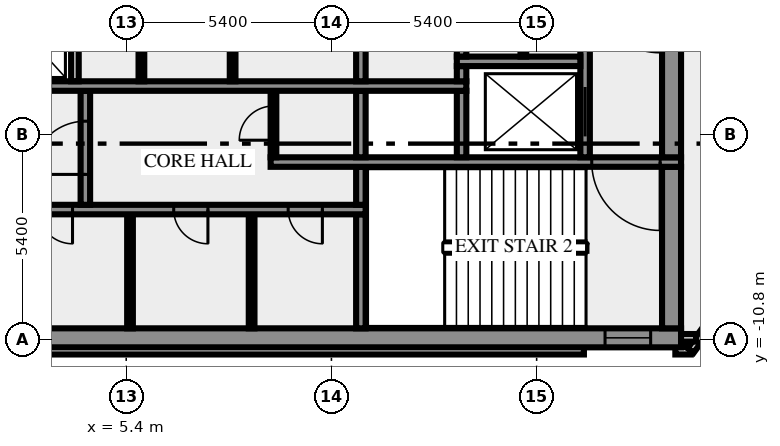
"""IFC4 building model, lengths in metres.
Left out: names, types, materials, properties, quantities, classifications, styles, units other than length and angle.
Written with IfcOpenShell. Run it as: python <this file> out.ifc"""

import sys

from ifc_helpers import new_model, si_unit, direction, frame, frame_2d, origin, place, context, subcontext, project, spatial, rectangle, extrude, element, fill, save


model = new_model("IFC4")
c1 = context("Model", 3, precision=1e-05, world=origin(), true_north=direction((0.0, 1.0)))
c2 = subcontext(c1, "Body", "Model", "MODEL_VIEW")
j1 = project(units=[si_unit("LENGTHUNIT", "METRE"), si_unit("PLANEANGLEUNIT", "RADIAN")], contexts=[c1])
p1 = place(None, origin())
s1 = spatial("IfcSite", under=j1, at=p1, CompositionType="ELEMENT")
p2 = place(p1, origin())
s2 = spatial("IfcBuilding", under=s1, at=p2, CompositionType="ELEMENT")
p3 = place(p2, frame((0.0, 0.0, 327.0)))
s3 = spatial("IfcBuildingStorey", under=s2, at=p3, CompositionType="ELEMENT", Elevation=327.0)
p4 = place(p3, frame((-17.444, -11.088, 0.0), z_axis=(0.0, 0.0, 1.0), x_axis=(1.0, 0.0, 0.0)))
e1 = element("IfcWall", 1, at=p4, inside=s3, PredefinedType="SOLIDWALL", context=c2, shape_type="SweptSolid", body=[
    extrude(rectangle(XDim=34.888, YDim=0.2, at=frame_2d((17.444, 0.0))), origin(), (0.0, 0.0, 1.0), 3.65),
])
p5 = place(p3, frame((19.85, -11.088, 0.0), z_axis=(0.0, 0.0, 1.0), x_axis=(1.0, 0.0, 0.0)))
e2 = element("IfcWall", 2, at=p5, inside=s3, PredefinedType="SOLIDWALL", context=c2, shape_type="SweptSolid", body=[
    extrude(rectangle(XDim=0.406, YDim=0.2, at=frame_2d((0.203, 0.0))), origin(), (0.0, 0.0, 1.0), 3.65),
])
p6 = place(p3, frame((20.253, -11.083, 0.0), z_axis=(0.0, 0.0, 1.0), x_axis=(0.587766567315, 0.809030569476, 0.0)))
e3 = element("IfcWall", 3, at=p6, inside=s3, PredefinedType="SOLIDWALL", context=c2, shape_type="SweptSolid", body=[
    extrude(rectangle(XDim=2.688, YDim=0.2, at=frame_2d((1.344, 0.0))), origin(), (0.0, 0.0, 1.0), 3.65),
])
p7 = place(p3, frame((19.98, -10.75, 0.0), z_axis=(0.0, 0.0, 1.0), x_axis=(1.0, 0.0, 0.0)))
e4 = element("IfcWall", 4, at=p7, inside=s3, PredefinedType="SOLIDWALL", context=c2, shape_type="SweptSolid", body=[
    extrude(rectangle(XDim=0.417, YDim=0.2, at=frame_2d((0.208, 0.0))), origin(), (0.0, 0.0, 1.0), 3.65),
])
p8 = place(p3, frame((-20.0, -10.75, 0.0), z_axis=(0.0, 0.0, 1.0), x_axis=(1.0, 0.0, 0.0)))
e5 = element("IfcWall", 5, at=p8, inside=s3, PredefinedType="SHEAR", context=c2, shape_type="SweptSolid", body=[
    extrude(rectangle(XDim=40.0, YDim=0.5, at=frame_2d((20.0, 0.0))), origin(), (0.0, 0.0, 1.0), 3.65),
])
p9 = place(p8, frame((0.8, 0.0, 1.0)))
e6 = element("IfcOpeningElement", 6, at=p9, cuts=e5, PredefinedType="OPENING", context=c2, shape_type="SweptSolid", body=[
    extrude(rectangle(XDim=1.2, YDim=1.2, at=frame_2d((0.6, 0.6))), frame((0.0, 0.26, 0.0), z_axis=(0.0, -1.0, 0.0), x_axis=(1.0, 0.0, 0.0)), (0.0, 0.0, 1.0), 0.52),
])
p10 = place(p8, frame((38.0, 0.0, 1.0)))
e7 = element("IfcOpeningElement", 7, at=p10, cuts=e5, PredefinedType="OPENING", context=c2, shape_type="SweptSolid", body=[
    extrude(rectangle(XDim=1.2, YDim=1.2, at=frame_2d((0.6, 0.6))), frame((0.0, 0.26, 0.0), z_axis=(0.0, -1.0, 0.0), x_axis=(1.0, 0.0, 0.0)), (0.0, 0.0, 1.0), 0.52),
])
for number, where, z_axis, x_axis in (
    (8, (5.5, -10.5, 0.0), (0.0, 0.0, 1.0), (0.0, 1.0, 0.0)),
    (9, (8.7, -10.5, 0.0), (0.0, 0.0, 1.0), (0.0, 1.0, 0.0)),
):
    element("IfcWall", number, at=place(p3, frame(where, z_axis=z_axis, x_axis=x_axis)), inside=s3, PredefinedType="PARTITIONING", context=c2, shape_type="SweptSolid", body=[
        extrude(rectangle(XDim=3.0, YDim=0.15, at=frame_2d((1.5, 0.0))), origin(), (0.0, 0.0, 1.0), 3.65),
    ])
p11 = place(p3, frame((11.575, -10.5, 0.0), z_axis=(0.0, 0.0, 1.0), x_axis=(0.0, 1.0, 0.0)))
e10 = element("IfcWall", 10, at=p11, inside=s3, PredefinedType="SHEAR", context=c2, shape_type="SweptSolid", body=[
    extrude(rectangle(XDim=3.0, YDim=0.25, at=frame_2d((1.5, 0.0))), origin(), (0.0, 0.0, 1.0), 3.65),
])
p12 = place(p3, frame((19.75, -10.5, 0.0), z_axis=(0.0, 0.0, 1.0), x_axis=(0.0, 1.0, 0.0)))
e11 = element("IfcWall", 11, at=p12, inside=s3, PredefinedType="SHEAR", context=c2, shape_type="SweptSolid", body=[
    extrude(rectangle(XDim=4.25, YDim=0.5, at=frame_2d((2.125, 0.0))), origin(), (0.0, 0.0, 1.0), 3.65),
])
p13 = place(p3, frame((11.7, -7.375, 0.0), z_axis=(0.0, 0.0, 1.0), x_axis=(-1.0, 0.0, 0.0)))
e12 = element("IfcWall", 12, at=p13, inside=s3, PredefinedType="SHEAR", context=c2, shape_type="SweptSolid", body=[
    extrude(rectangle(XDim=23.4, YDim=0.25, at=frame_2d((11.7, 0.0))), origin(), (0.0, 0.0, 1.0), 3.65),
])
p14 = place(p13, frame((22.225, 0.0, 0.0)))
e13 = element("IfcOpeningElement", 13, at=p14, cuts=e12, PredefinedType="OPENING", context=c2, shape_type="SweptSolid", body=[
    extrude(rectangle(XDim=0.8, YDim=2.1, at=frame_2d((0.4, 1.05))), frame((0.0, 0.135, 0.0), z_axis=(0.0, -1.0, 0.0), x_axis=(1.0, 0.0, 0.0)), (0.0, 0.0, 1.0), 0.27),
])
p15 = place(p13, frame((20.2, 0.0, 0.0)))
e14 = element("IfcOpeningElement", 14, at=p15, cuts=e12, PredefinedType="OPENING", context=c2, shape_type="SweptSolid", body=[
    extrude(rectangle(XDim=1.1, YDim=2.1, at=frame_2d((0.55, 1.05))), frame((0.0, 0.135, 0.0), z_axis=(0.0, -1.0, 0.0), x_axis=(1.0, 0.0, 0.0)), (0.0, 0.0, 1.0), 0.27),
])
p16 = place(p13, frame((17.7, 0.0, 0.0)))
e15 = element("IfcOpeningElement", 15, at=p16, cuts=e12, PredefinedType="OPENING", context=c2, shape_type="SweptSolid", body=[
    extrude(rectangle(XDim=1.1, YDim=2.1, at=frame_2d((0.55, 1.05))), frame((0.0, 0.135, 0.0), z_axis=(0.0, -1.0, 0.0), x_axis=(1.0, 0.0, 0.0)), (0.0, 0.0, 1.0), 0.27),
])
p17 = place(p13, frame((15.975, 0.0, 0.0)))
e16 = element("IfcOpeningElement", 16, at=p17, cuts=e12, PredefinedType="OPENING", context=c2, shape_type="SweptSolid", body=[
    extrude(rectangle(XDim=0.8, YDim=2.1, at=frame_2d((0.4, 1.05))), frame((0.0, 0.135, 0.0), z_axis=(0.0, -1.0, 0.0), x_axis=(1.0, 0.0, 0.0)), (0.0, 0.0, 1.0), 0.27),
])
p18 = place(p13, frame((14.5, 0.0, 0.0)))
e17 = element("IfcOpeningElement", 17, at=p18, cuts=e12, PredefinedType="OPENING", context=c2, shape_type="SweptSolid", body=[
    extrude(rectangle(XDim=0.9, YDim=2.1, at=frame_2d((0.45, 1.05))), frame((0.0, 0.135, 0.0), z_axis=(0.0, -1.0, 0.0), x_axis=(1.0, 0.0, 0.0)), (0.0, 0.0, 1.0), 0.27),
])
p19 = place(p13, frame((12.95, 0.0, 0.0)))
e18 = element("IfcOpeningElement", 18, at=p19, cuts=e12, PredefinedType="OPENING", context=c2, shape_type="SweptSolid", body=[
    extrude(rectangle(XDim=0.9, YDim=2.1, at=frame_2d((0.45, 1.05))), frame((0.0, 0.135, 0.0), z_axis=(0.0, -1.0, 0.0), x_axis=(1.0, 0.0, 0.0)), (0.0, 0.0, 1.0), 0.27),
])
p20 = place(p13, frame((11.475, 0.0, 0.0)))
e19 = element("IfcOpeningElement", 19, at=p20, cuts=e12, PredefinedType="OPENING", context=c2, shape_type="SweptSolid", body=[
    extrude(rectangle(XDim=0.9, YDim=2.1, at=frame_2d((0.45, 1.05))), frame((0.0, 0.135, 0.0), z_axis=(0.0, -1.0, 0.0), x_axis=(1.0, 0.0, 0.0)), (0.0, 0.0, 1.0), 0.27),
])
p21 = place(p13, frame((10.45, 0.0, 0.0)))
e20 = element("IfcOpeningElement", 20, at=p21, cuts=e12, PredefinedType="OPENING", context=c2, shape_type="SweptSolid", body=[
    extrude(rectangle(XDim=0.5, YDim=2.1, at=frame_2d((0.25, 1.05))), frame((0.0, 0.135, 0.0), z_axis=(0.0, -1.0, 0.0), x_axis=(1.0, 0.0, 0.0)), (0.0, 0.0, 1.0), 0.27),
])
p22 = place(p13, frame((7.713, 0.0, 0.0)))
e21 = element("IfcOpeningElement", 21, at=p22, cuts=e12, PredefinedType="OPENING", context=c2, shape_type="SweptSolid", body=[
    extrude(rectangle(XDim=0.9, YDim=2.1, at=frame_2d((0.45, 1.05))), frame((0.0, 0.135, 0.0), z_axis=(0.0, -1.0, 0.0), x_axis=(1.0, 0.0, 0.0)), (0.0, 0.0, 1.0), 0.27),
])
p23 = place(p13, frame((4.15, 0.0, 0.0)))
e22 = element("IfcOpeningElement", 22, at=p23, cuts=e12, PredefinedType="OPENING", context=c2, shape_type="SweptSolid", body=[
    extrude(rectangle(XDim=0.9, YDim=2.1, at=frame_2d((0.45, 1.05))), frame((0.0, 0.135, 0.0), z_axis=(0.0, -1.0, 0.0), x_axis=(1.0, 0.0, 0.0)), (0.0, 0.0, 1.0), 0.27),
])
p24 = place(p13, frame((1.138, 0.0, 0.0)))
e23 = element("IfcOpeningElement", 23, at=p24, cuts=e12, PredefinedType="OPENING", context=c2, shape_type="SweptSolid", body=[
    extrude(rectangle(XDim=0.9, YDim=2.1, at=frame_2d((0.45, 1.05))), frame((0.0, 0.135, 0.0), z_axis=(0.0, -1.0, 0.0), x_axis=(1.0, 0.0, 0.0)), (0.0, 0.0, 1.0), 0.27),
])
p25 = place(p3, frame((4.325, -7.25, 0.0), z_axis=(0.0, 0.0, 1.0), x_axis=(0.0, 1.0, 0.0)))
e24 = element("IfcWall", 24, at=p25, inside=s3, PredefinedType="SHEAR", context=c2, shape_type="SweptSolid", body=[
    extrude(rectangle(XDim=3.0, YDim=0.25, at=frame_2d((1.5, 0.0))), origin(), (0.0, 0.0, 1.0), 3.65),
])
p26 = place(p25, frame((0.8, 0.0, 0.0)))
e25 = element("IfcOpeningElement", 25, at=p26, cuts=e24, PredefinedType="OPENING", context=c2, shape_type="SweptSolid", body=[
    extrude(rectangle(XDim=1.4, YDim=2.1, at=frame_2d((0.7, 1.05))), frame((0.0, 0.135, 0.0), z_axis=(0.0, -1.0, 0.0), x_axis=(1.0, 0.0, 0.0)), (0.0, 0.0, 1.0), 0.27),
])
p27 = place(p3, frame((11.575, -7.25, 0.0), z_axis=(0.0, 0.0, 1.0), x_axis=(0.0, 1.0, 0.0)))
e26 = element("IfcWall", 26, at=p27, inside=s3, PredefinedType="SHEAR", context=c2, shape_type="SweptSolid", body=[
    extrude(rectangle(XDim=1.0, YDim=0.25, at=frame_2d((0.5, 0.0))), origin(), (0.0, 0.0, 1.0), 3.65),
])
p28 = place(p3, frame((20.0, -6.125, 0.0), z_axis=(0.0, 0.0, 1.0), x_axis=(-1.0, 0.0, 0.0)))
e27 = element("IfcWall", 27, at=p28, inside=s3, PredefinedType="SHEAR", context=c2, shape_type="SweptSolid", body=[
    extrude(rectangle(XDim=10.8, YDim=0.25, at=frame_2d((5.4, 0.0))), origin(), (0.0, 0.0, 1.0), 3.65),
])
p29 = place(p28, frame((0.55, 0.0, 0.0)))
e28 = element("IfcOpeningElement", 28, at=p29, cuts=e27, PredefinedType="OPENING", context=c2, shape_type="SweptSolid", body=[
    extrude(rectangle(XDim=1.8, YDim=2.1, at=frame_2d((0.9, 1.05))), frame((0.0, 0.135, 0.0), z_axis=(0.0, -1.0, 0.0), x_axis=(1.0, 0.0, 0.0)), (0.0, 0.0, 1.0), 0.27),
])
p30 = place(p3, frame((9.275, -6.0, 0.0), z_axis=(0.0, 0.0, 1.0), x_axis=(0.0, 1.0, 0.0)))
e29 = element("IfcWall", 29, at=p30, inside=s3, PredefinedType="PARTITIONING", context=c2, shape_type="SweptSolid", body=[
    extrude(rectangle(XDim=1.75, YDim=0.15, at=frame_2d((0.875, 0.0))), origin(), (0.0, 0.0, 1.0), 3.65),
])
p31 = place(p30, frame((0.45, 0.0, 0.0)))
e30 = element("IfcOpeningElement", 30, at=p31, cuts=e29, PredefinedType="OPENING", context=c2, shape_type="SweptSolid", body=[
    extrude(rectangle(XDim=0.9, YDim=2.1, at=frame_2d((0.45, 1.05))), frame((0.0, 0.085, 0.0), z_axis=(0.0, -1.0, 0.0), x_axis=(1.0, 0.0, 0.0)), (0.0, 0.0, 1.0), 0.17),
])
for number, where, z_axis, x_axis in (
    (31, (11.575, -6.0, 0.0), (0.0, 0.0, 1.0), (0.0, 1.0, 0.0)),
    (32, (14.225, -6.0, 0.0), (0.0, 0.0, 1.0), (0.0, 1.0, 0.0)),
):
    element("IfcWall", number, at=place(p3, frame(where, z_axis=z_axis, x_axis=x_axis)), inside=s3, PredefinedType="SHEAR", context=c2, shape_type="SweptSolid", body=[
        extrude(rectangle(XDim=1.75, YDim=0.25, at=frame_2d((0.875, 0.0))), origin(), (0.0, 0.0, 1.0), 3.65),
    ])
p32 = place(p3, frame((17.475, -6.0, 0.0), z_axis=(0.0, 0.0, 1.0), x_axis=(0.0, 1.0, 0.0)))
e33 = element("IfcWall", 33, at=p32, inside=s3, PredefinedType="SHEAR", context=c2, shape_type="SweptSolid", body=[
    extrude(rectangle(XDim=4.3, YDim=0.25, at=frame_2d((2.15, 0.0))), origin(), (0.0, 0.0, 1.0), 3.65),
])
p33 = place(p32, frame((0.55, 0.0, 0.0)))
e34 = element("IfcOpeningElement", 34, at=p33, cuts=e33, PredefinedType="OPENING", context=c2, shape_type="SweptSolid", body=[
    extrude(rectangle(XDim=1.3, YDim=2.1, at=frame_2d((0.65, 1.05))), frame((0.0, 0.135, 0.0), z_axis=(0.0, -1.0, 0.0), x_axis=(1.0, 0.0, 0.0)), (0.0, 0.0, 1.0), 0.27),
])
p34 = place(p3, frame((19.75, -6.0, 0.0), z_axis=(0.0, 0.0, 1.0), x_axis=(0.0, 1.0, 0.0)))
e35 = element("IfcWall", 35, at=p34, inside=s3, PredefinedType="SHEAR", context=c2, shape_type="SweptSolid", body=[
    extrude(rectangle(XDim=4.3, YDim=0.5, at=frame_2d((2.15, 0.0))), origin(), (0.0, 0.0, 1.0), 3.65),
])
p35 = place(p3, frame((-0.6, -4.125, 0.0), z_axis=(0.0, 0.0, 1.0), x_axis=(1.0, 0.0, 0.0)))
e36 = element("IfcWall", 36, at=p35, inside=s3, PredefinedType="SHEAR", context=c2, shape_type="SweptSolid", body=[
    extrude(rectangle(XDim=14.95, YDim=0.25, at=frame_2d((7.475, 0.0))), origin(), (0.0, 0.0, 1.0), 3.65),
])
p36 = place(p35, frame((2.75, 0.0, 0.0)))
e37 = element("IfcOpeningElement", 37, at=p36, cuts=e36, PredefinedType="OPENING", context=c2, shape_type="SweptSolid", body=[
    extrude(rectangle(XDim=1.3, YDim=2.1, at=frame_2d((0.65, 1.05))), frame((0.0, 0.135, 0.0), z_axis=(0.0, -1.0, 0.0), x_axis=(1.0, 0.0, 0.0)), (0.0, 0.0, 1.0), 0.27),
])
p37 = place(p3, frame((4.05, -4.0, 0.0), z_axis=(0.0, 0.0, 1.0), x_axis=(0.0, 1.0, 0.0)))
e38 = element("IfcWall", 38, at=p37, inside=s3, PredefinedType="SOLIDWALL", context=c2, shape_type="SweptSolid", body=[
    extrude(rectangle(XDim=2.3, YDim=0.2, at=frame_2d((1.15, 0.0))), origin(), (0.0, 0.0, 1.0), 3.65),
])
for number, where, z_axis, x_axis in (
    (39, (5.8, -4.0, 0.0), (0.0, 0.0, 1.0), (0.0, 1.0, 0.0)),
    (40, (8.2, -4.0, 0.0), (0.0, 0.0, 1.0), (0.0, 1.0, 0.0)),
):
    element("IfcWall", number, at=place(p3, frame(where, z_axis=z_axis, x_axis=x_axis)), inside=s3, PredefinedType="PARTITIONING", context=c2, shape_type="SweptSolid", body=[
        extrude(rectangle(XDim=2.3, YDim=0.15, at=frame_2d((1.15, 0.0))), origin(), (0.0, 0.0, 1.0), 3.65),
    ])
p38 = place(p3, frame((11.575, -4.0, 0.0), z_axis=(0.0, 0.0, 1.0), x_axis=(0.0, 1.0, 0.0)))
e41 = element("IfcWall", 41, at=p38, inside=s3, PredefinedType="SHEAR", context=c2, shape_type="SweptSolid", body=[
    extrude(rectangle(XDim=2.3, YDim=0.25, at=frame_2d((1.15, 0.0))), origin(), (0.0, 0.0, 1.0), 3.65),
])
p39 = place(p3, frame((14.225, -4.0, 0.0), z_axis=(0.0, 0.0, 1.0), x_axis=(0.0, 1.0, 0.0)))
e42 = element("IfcWall", 42, at=p39, inside=s3, PredefinedType="SHEAR", context=c2, shape_type="SweptSolid", body=[
    extrude(rectangle(XDim=0.4, YDim=0.25, at=frame_2d((0.2, 0.0))), origin(), (0.0, 0.0, 1.0), 3.65),
])
p40 = place(p3, frame((14.1, -3.475, 0.0), z_axis=(0.0, 0.0, 1.0), x_axis=(1.0, 0.0, 0.0)))
e43 = element("IfcWall", 43, at=p40, inside=s3, PredefinedType="SHEAR", context=c2, shape_type="SweptSolid", body=[
    extrude(rectangle(XDim=3.25, YDim=0.25, at=frame_2d((1.625, 0.0))), origin(), (0.0, 0.0, 1.0), 3.65),
])
p41 = place(p3, frame((14.225, -3.35, 0.0), z_axis=(0.0, 0.0, 1.0), x_axis=(0.0, 1.0, 0.0)))
e44 = element("IfcWall", 44, at=p41, inside=s3, PredefinedType="SHEAR", context=c2, shape_type="SweptSolid", body=[
    extrude(rectangle(XDim=1.65, YDim=0.25, at=frame_2d((0.825, 0.0))), origin(), (0.0, 0.0, 1.0), 3.65),
])
p42 = place(p3, frame((15.85, -3.35, 0.0), z_axis=(0.0, 0.0, 1.0), x_axis=(0.0, 1.0, 0.0)))
e45 = element("IfcWall", 45, at=p42, inside=s3, PredefinedType="PARTITIONING", context=c2, shape_type="SweptSolid", body=[
    extrude(rectangle(XDim=1.65, YDim=0.15, at=frame_2d((0.825, 0.0))), origin(), (0.0, 0.0, 1.0), 3.65),
])
p43 = place(p10, origin())
e46 = element("IfcWindow", 46, at=p43, inside=s3, PartitioningType="SINGLE_PANEL", PredefinedType="WINDOW", context=c2, shape_type="SweptSolid", body=[
    extrude(rectangle(XDim=1.2, YDim=1.2, at=frame_2d((0.6, 0.6))), frame((0.0, 0.03, 0.0), z_axis=(0.0, -1.0, 0.0), x_axis=(1.0, 0.0, 0.0)), (0.0, 0.0, 1.0), 0.06),
])
fill(e7, e46)
p44 = place(p22, origin())
e47 = element("IfcDoor", 47, at=p44, inside=s3, OperationType="SINGLE_SWING_LEFT", PredefinedType="DOOR", context=c2, shape_type="SweptSolid", body=[
    extrude(rectangle(XDim=0.9, YDim=2.1, at=frame_2d((0.45, 1.05))), frame((0.0, 0.025, 0.0), z_axis=(0.0, -1.0, 0.0), x_axis=(1.0, 0.0, 0.0)), (0.0, 0.0, 1.0), 0.05),
])
fill(e21, e47)
p45 = place(p23, origin())
e48 = element("IfcDoor", 48, at=p45, inside=s3, OperationType="SINGLE_SWING_LEFT", PredefinedType="DOOR", context=c2, shape_type="SweptSolid", body=[
    extrude(rectangle(XDim=0.9, YDim=2.1, at=frame_2d((0.45, 1.05))), frame((0.0, 0.025, 0.0), z_axis=(0.0, -1.0, 0.0), x_axis=(1.0, 0.0, 0.0)), (0.0, 0.0, 1.0), 0.05),
])
fill(e22, e48)
p46 = place(p24, origin())
e49 = element("IfcDoor", 49, at=p46, inside=s3, OperationType="SINGLE_SWING_LEFT", PredefinedType="DOOR", context=c2, shape_type="SweptSolid", body=[
    extrude(rectangle(XDim=0.9, YDim=2.1, at=frame_2d((0.45, 1.05))), frame((0.0, 0.025, 0.0), z_axis=(0.0, -1.0, 0.0), x_axis=(1.0, 0.0, 0.0)), (0.0, 0.0, 1.0), 0.05),
])
fill(e23, e49)
p47 = place(p26, origin())
e50 = element("IfcDoor", 50, at=p47, inside=s3, OperationType="DOUBLE_DOOR_SINGLE_SWING", PredefinedType="DOOR", context=c2, shape_type="SweptSolid", body=[
    extrude(rectangle(XDim=1.4, YDim=2.1, at=frame_2d((0.7, 1.05))), frame((0.0, 0.025, 0.0), z_axis=(0.0, -1.0, 0.0), x_axis=(1.0, 0.0, 0.0)), (0.0, 0.0, 1.0), 0.05),
])
fill(e25, e50)
p48 = place(p29, origin())
e51 = element("IfcDoor", 51, at=p48, inside=s3, OperationType="DOUBLE_DOOR_SINGLE_SWING", PredefinedType="DOOR", context=c2, shape_type="SweptSolid", body=[
    extrude(rectangle(XDim=1.8, YDim=2.1, at=frame_2d((0.9, 1.05))), frame((0.0, 0.025, 0.0), z_axis=(0.0, -1.0, 0.0), x_axis=(1.0, 0.0, 0.0)), (0.0, 0.0, 1.0), 0.05),
])
fill(e28, e51)
p49 = place(p31, origin())
e52 = element("IfcDoor", 52, at=p49, inside=s3, OperationType="SINGLE_SWING_RIGHT", PredefinedType="DOOR", context=c2, shape_type="SweptSolid", body=[
    extrude(rectangle(XDim=0.9, YDim=2.1, at=frame_2d((0.45, 1.05))), frame((0.0, 0.025, 0.0), z_axis=(0.0, -1.0, 0.0), x_axis=(1.0, 0.0, 0.0)), (0.0, 0.0, 1.0), 0.05),
])
fill(e30, e52)
p50 = place(p33, origin())
e53 = element("IfcDoor", 53, at=p50, inside=s3, OperationType="DOUBLE_DOOR_SLIDING", PredefinedType="DOOR", context=c2, shape_type="SweptSolid", body=[
    extrude(rectangle(XDim=1.3, YDim=2.1, at=frame_2d((0.65, 1.05))), frame((0.0, 0.025, 0.0), z_axis=(0.0, -1.0, 0.0), x_axis=(1.0, 0.0, 0.0)), (0.0, 0.0, 1.0), 0.05),
])
fill(e34, e53)
save(model, sys.argv[1])
